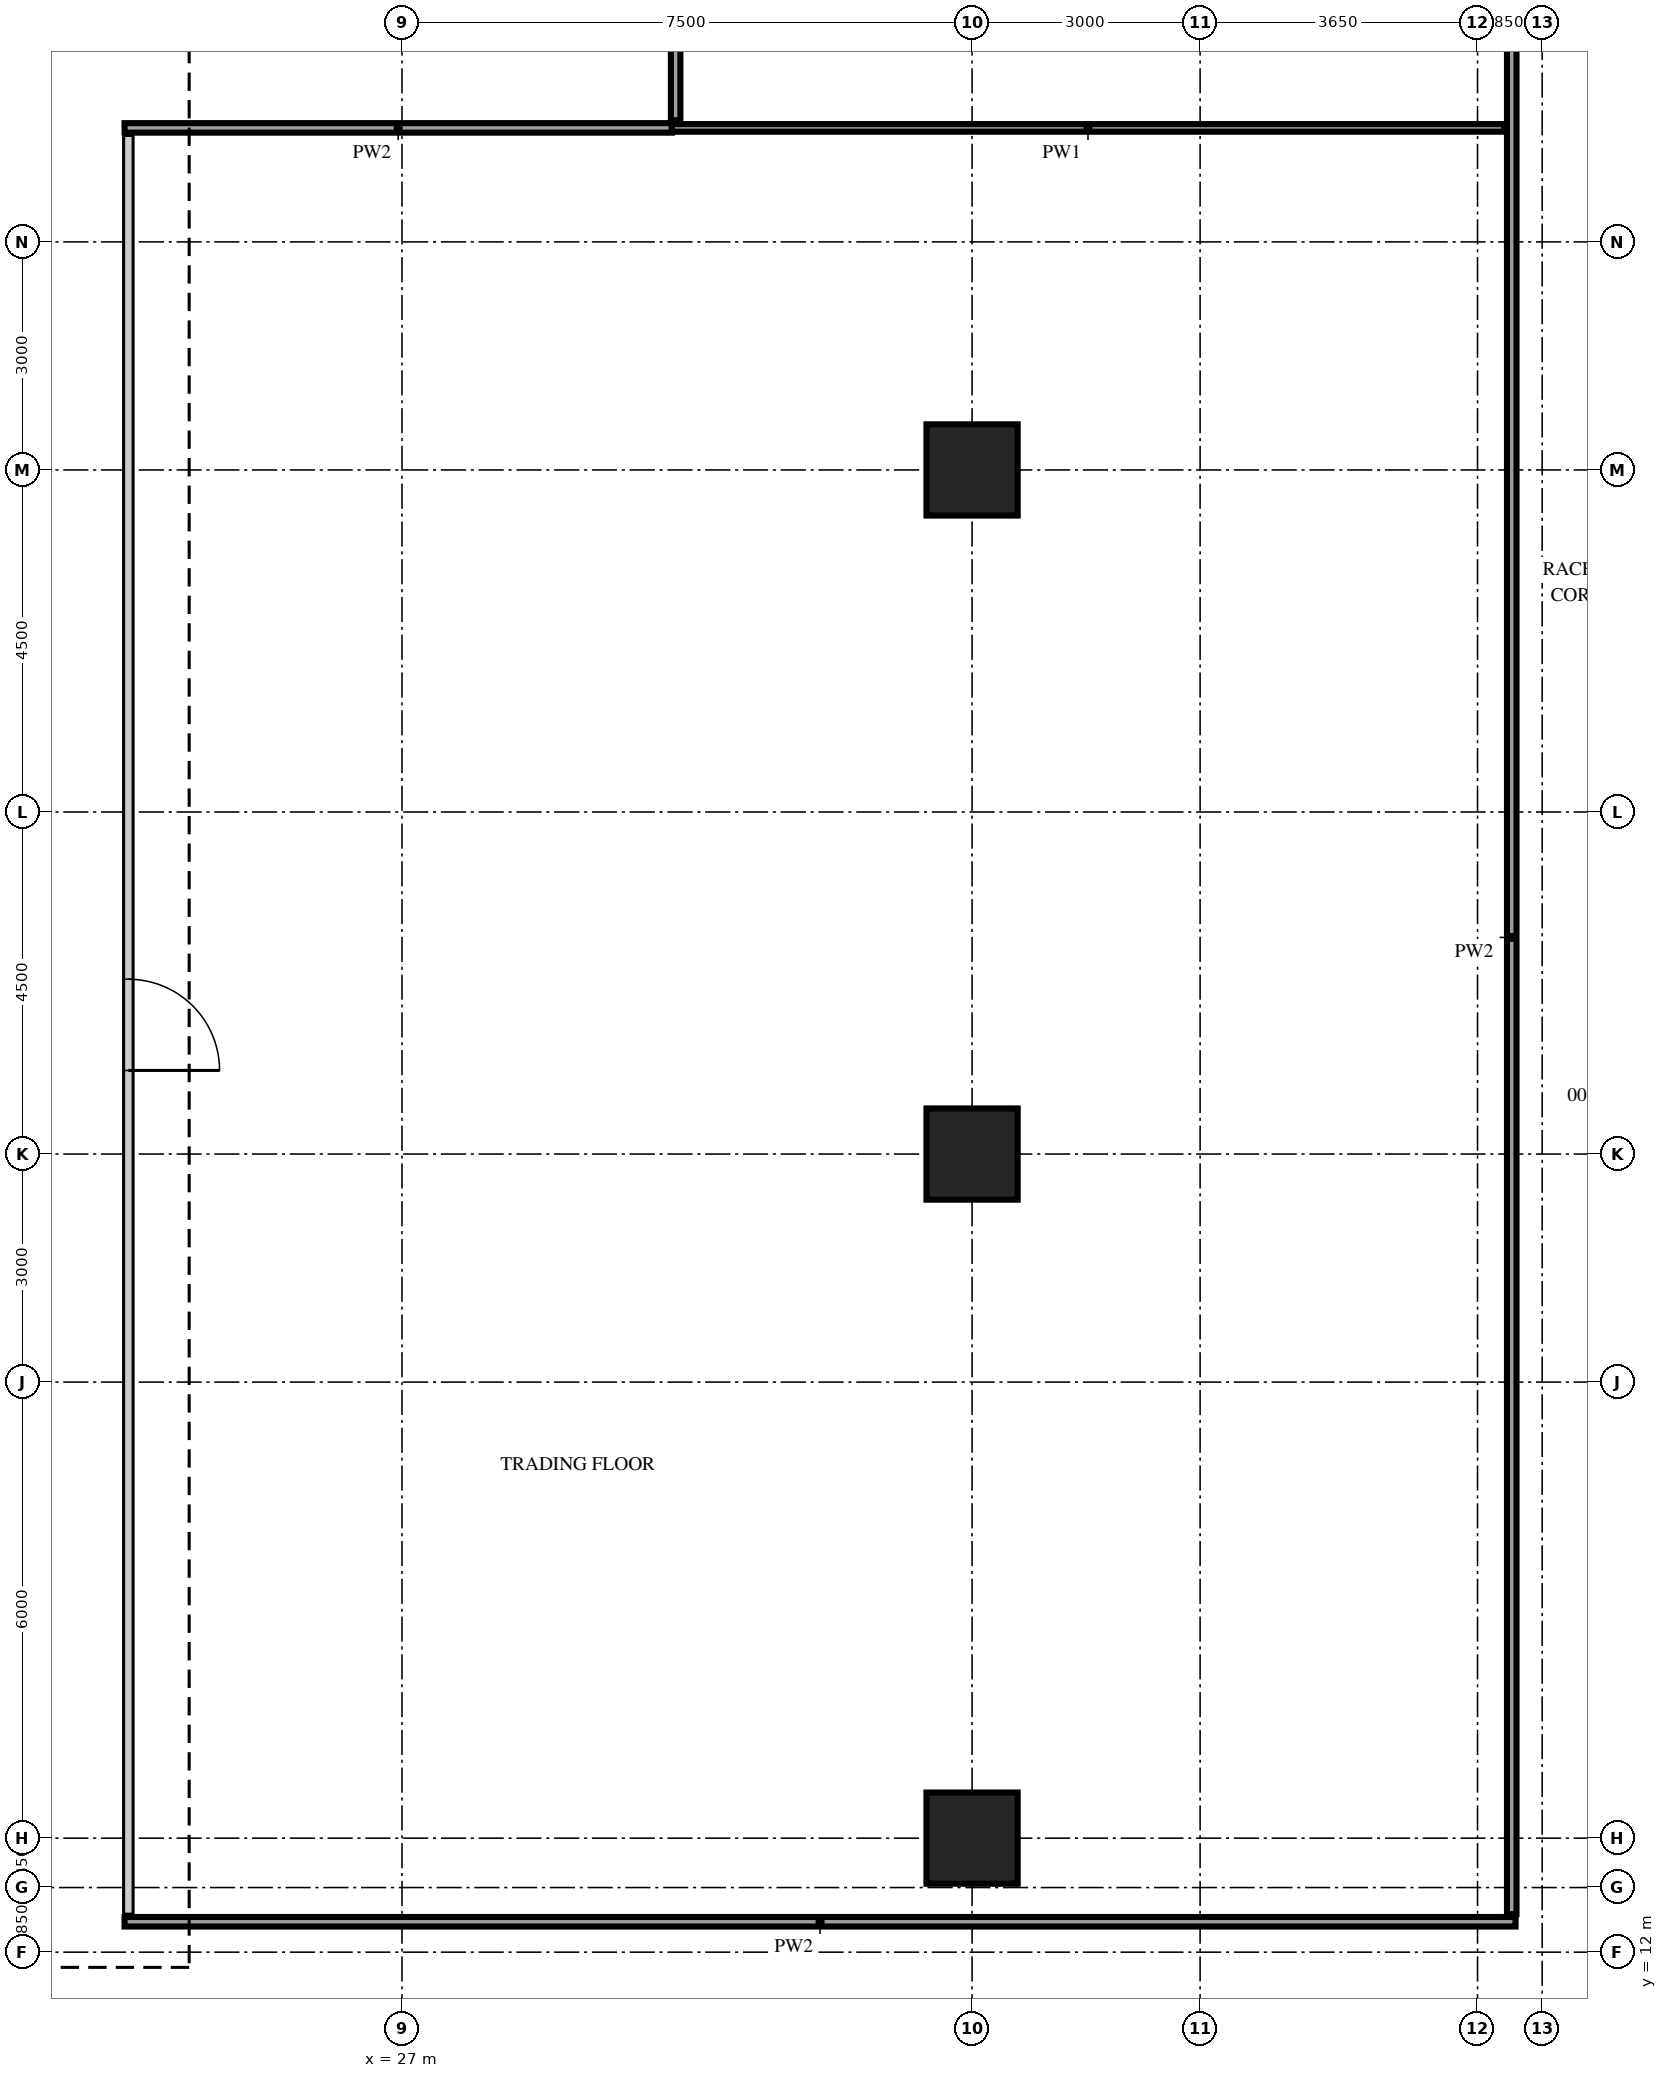
"""IFC4 building model, lengths in metres.
Left out: names, types, materials, properties, quantities, classifications, styles, units other than length and angle.
Written with IfcOpenShell. Run it as: python <this file> out.ifc"""

import sys

from ifc_helpers import new_model, si_unit, direction, frame, frame_2d, origin, origin_2d, place, context, subcontext, project, spatial, rectangle, extrude, source, transform, mapped, element, fill, save


model = new_model("IFC4")
c1 = context("Model", 3, precision=1e-05, world=origin(), true_north=direction((0.0, 1.0)))
c2 = subcontext(c1, "Body", "Model", "MODEL_VIEW")
j1 = project(units=[si_unit("LENGTHUNIT", "METRE"), si_unit("PLANEANGLEUNIT", "RADIAN")], contexts=[c1])
p1 = place(None, origin())
s1 = spatial("IfcSite", under=j1, at=p1, CompositionType="ELEMENT")
p2 = place(p1, origin())
s2 = spatial("IfcBuilding", under=s1, at=p2, CompositionType="ELEMENT")
p3 = place(p2, frame((0.0, 0.0, 208.7)))
s3 = spatial("IfcBuildingStorey", under=s2, at=p3, CompositionType="ELEMENT", Elevation=208.7)
m1 = source(origin(), c2, "Body", "SweptSolid", [
    extrude(rectangle(XDim=1.2, YDim=1.2, at=origin_2d()), origin(), (0.0, 0.0, 1.0), 3.75),
])
for number, where, z_axis, x_axis in (
    (1, (34.5, 13.5, 0.0), (0.0, 0.0, 1.0), (1.0, 0.0, 0.0)),
    (2, (34.5, 22.5, 0.0), (0.0, 0.0, 1.0), (1.0, 0.0, 0.0)),
    (3, (34.5, 31.5, 0.0), (0.0, 0.0, 1.0), (1.0, 0.0, 0.0)),
):
    element("IfcColumn", number, at=place(p3, frame(where, z_axis=z_axis, x_axis=x_axis)), inside=s3, PredefinedType="COLUMN", context=c2, shape_type="MappedRepresentation", body=[
        mapped(m1, transform((0.0, 0.0, 0.0))),
    ])
m2 = source(origin(), c2, "Body", "SweptSolid", [
    extrude(rectangle(XDim=18.3, YDim=0.125, at=frame_2d((9.15, 0.0))), origin(), (0.0, 0.0, 1.0), 3.8),
])
p4 = place(p3, frame((23.35, 12.4, 0.0), z_axis=(0.0, 0.0, 1.0), x_axis=(1.0, 0.0, 0.0)))
e4 = element("IfcWall", 4, at=p4, inside=s3, PredefinedType="PARTITIONING", context=c2, shape_type="MappedRepresentation", body=[
    mapped(m2, transform((0.0, 0.0, 0.0))),
])
m3 = source(origin(), c2, "Body", "SweptSolid", [
    extrude(rectangle(XDim=23.4, YDim=0.125, at=frame_2d((11.7, 0.0))), origin(), (0.0, 0.0, 1.0), 3.8),
])
p5 = place(p3, frame((23.4, 12.5, 0.0), z_axis=(0.0, 0.0, 1.0), x_axis=(0.0, 1.0, 0.0)))
e5 = element("IfcWall", 5, at=p5, inside=s3, PredefinedType="PARTITIONING", context=c2, shape_type="MappedRepresentation", body=[
    mapped(m3, transform((0.0, 0.0, 0.0))),
])
m4 = source(origin(), c2, "Body", "SweptSolid", [
    extrude(rectangle(XDim=1.2, YDim=2.1, at=frame_2d((0.6, 1.05))), frame((0.0, 0.073, 0.0), z_axis=(0.0, -1.0, 0.0), x_axis=(1.0, 0.0, 0.0)), (0.0, 0.0, 1.0), 0.145),
])
p6 = place(p5, frame((11.1, 0.0, 0.0)))
e6 = element("IfcOpeningElement", 6, at=p6, cuts=e5, PredefinedType="OPENING", context=c2, shape_type="MappedRepresentation", body=[
    mapped(m4, transform((0.0, 0.0, 0.0))),
])
m5 = source(origin(), c2, "Body", "SweptSolid", [
    extrude(rectangle(XDim=29.0, YDim=0.125, at=frame_2d((14.5, 0.0))), origin(), (0.0, 0.0, 1.0), 3.8),
])
p7 = place(p3, frame((41.6, 12.5, 0.0), z_axis=(0.0, 0.0, 1.0), x_axis=(0.0, 1.0, 0.0)))
e7 = element("IfcWall", 7, at=p7, inside=s3, PredefinedType="PARTITIONING", context=c2, shape_type="MappedRepresentation", body=[
    mapped(m5, transform((0.0, 0.0, 0.0))),
])
m6 = source(origin(), c2, "Body", "SweptSolid", [
    extrude(rectangle(XDim=0.9, YDim=2.1, at=frame_2d((0.45, 1.05))), frame((0.0, 0.073, 0.0), z_axis=(0.0, -1.0, 0.0), x_axis=(1.0, 0.0, 0.0)), (0.0, 0.0, 1.0), 0.145),
])
p8 = place(p7, frame((25.7, 0.0, 0.0)))
e8 = element("IfcOpeningElement", 8, at=p8, cuts=e7, PredefinedType="OPENING", context=c2, shape_type="MappedRepresentation", body=[
    mapped(m6, transform((0.0, 0.0, 0.0))),
])
m7 = source(origin(), c2, "Body", "SweptSolid", [
    extrude(rectangle(XDim=7.2, YDim=0.125, at=frame_2d((3.6, 0.0))), origin(), (0.0, 0.0, 1.0), 3.8),
])
p9 = place(p3, frame((23.35, 36.0, 0.0), z_axis=(0.0, 0.0, 1.0), x_axis=(1.0, 0.0, 0.0)))
e9 = element("IfcWall", 9, at=p9, inside=s3, PredefinedType="PARTITIONING", context=c2, shape_type="MappedRepresentation", body=[
    mapped(m7, transform((0.0, 0.0, 0.0))),
])
m8 = source(origin(), c2, "Body", "SweptSolid", [
    extrude(rectangle(XDim=10.95, YDim=0.1, at=frame_2d((5.475, 0.0))), origin(), (0.0, 0.0, 1.0), 3.8),
])
p10 = place(p3, frame((30.55, 36.0, 0.0), z_axis=(0.0, 0.0, 1.0), x_axis=(1.0, 0.0, 0.0)))
e10 = element("IfcWall", 10, at=p10, inside=s3, PredefinedType="PARTITIONING", context=c2, shape_type="MappedRepresentation", body=[
    mapped(m8, transform((0.0, 0.0, 0.0))),
])
m9 = source(origin(), c2, "Body", "SweptSolid", [
    extrude(rectangle(XDim=5.4, YDim=0.125, at=frame_2d((2.7, 0.0))), origin(), (0.0, 0.0, 1.0), 3.8),
])
p11 = place(p3, frame((30.6, 36.1, 0.0), z_axis=(0.0, 0.0, 1.0), x_axis=(0.0, 1.0, 0.0)))
e11 = element("IfcWall", 11, at=p11, inside=s3, PredefinedType="PARTITIONING", context=c2, shape_type="MappedRepresentation", body=[
    mapped(m9, transform((0.0, 0.0, 0.0))),
])
m10 = source(origin(), c2, "Body", "SweptSolid", [
    extrude(rectangle(XDim=1.2, YDim=2.1, at=frame_2d((0.6, 1.05))), frame((0.0, 0.025, 0.0), z_axis=(0.0, -1.0, 0.0), x_axis=(1.0, 0.0, 0.0)), (0.0, 0.0, 1.0), 0.05),
])
p12 = place(p6, origin())
e12 = element("IfcDoor", 12, at=p12, inside=s3, OperationType="SINGLE_SWING_LEFT", PredefinedType="DOOR", context=c2, shape_type="MappedRepresentation", body=[
    mapped(m10, transform((0.0, 0.0, 0.0))),
])
fill(e6, e12)
save(model, sys.argv[1])
